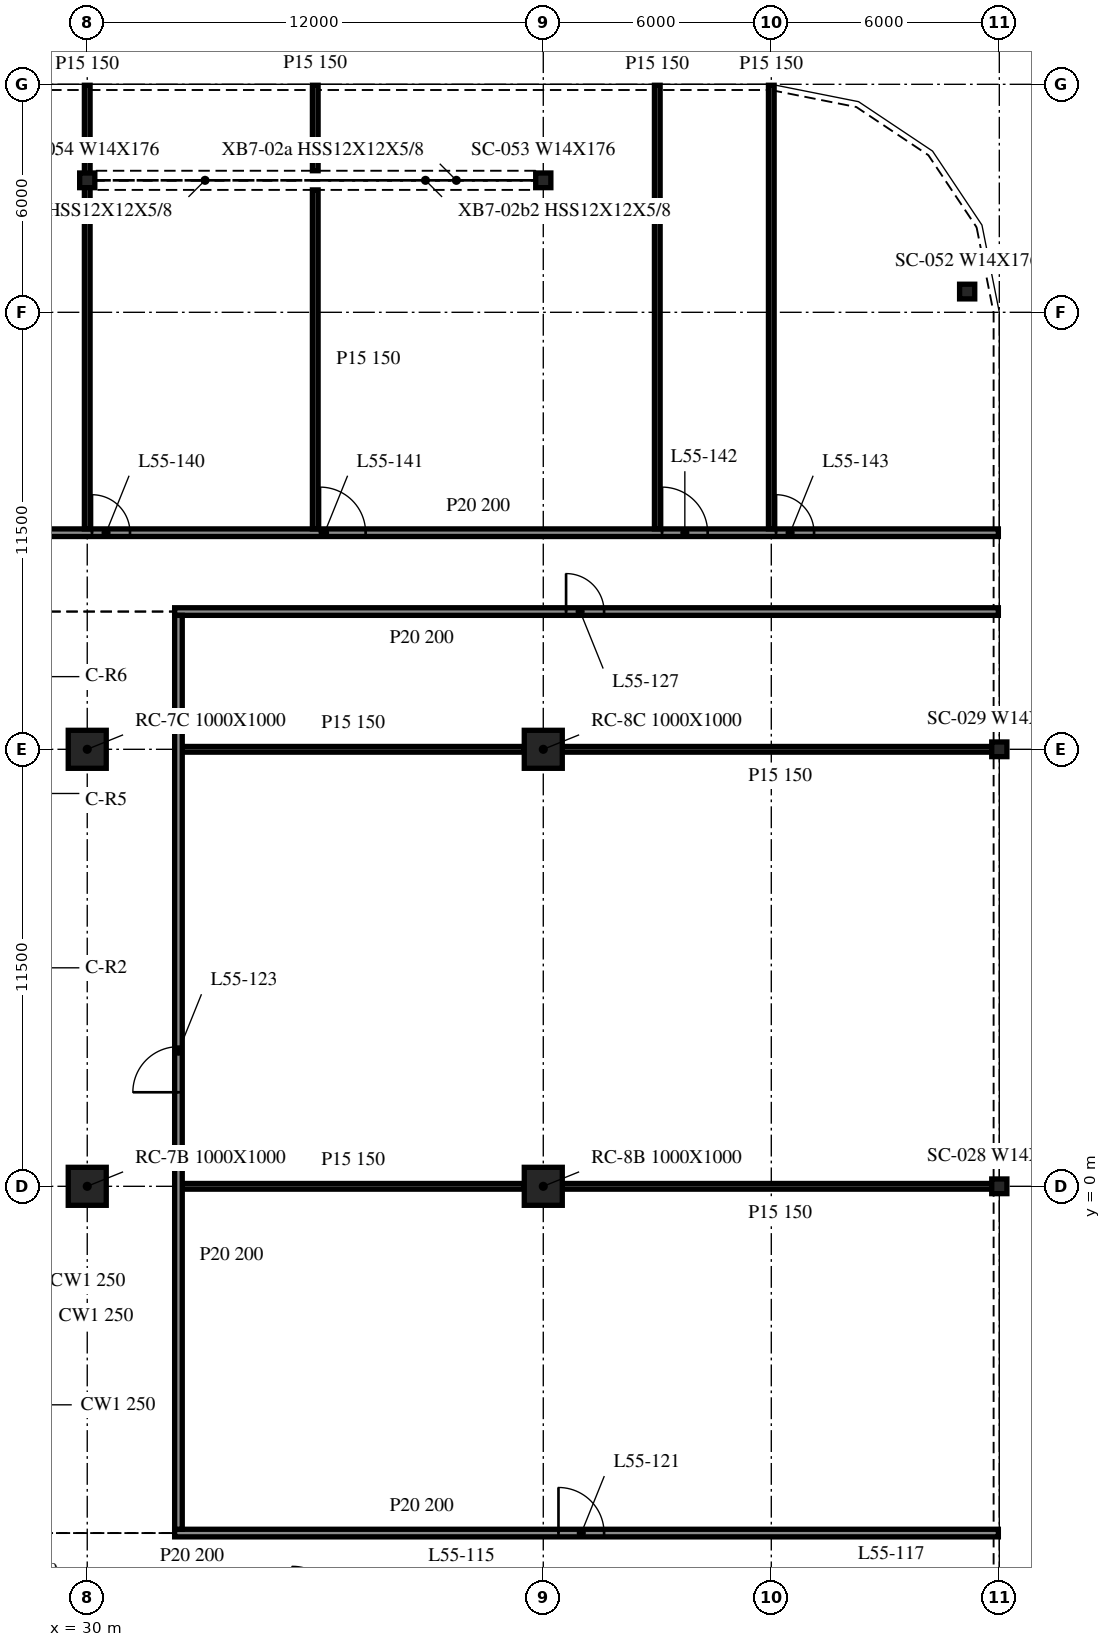
"""IFC4 building model, lengths in metres.
Left out: names, types, materials, properties, quantities, classifications, styles, units other than length and angle.
Written with IfcOpenShell. Run it as: python <this file> out.ifc"""

import sys

from ifc_helpers import new_model, si_unit, direction, frame, frame_2d, origin, origin_2d, place, context, subcontext, project, spatial, rectangle, i_section, extrude, element, fill, save


model = new_model("IFC4")
c1 = context("Model", 3, precision=1e-05, world=origin(), true_north=direction((0.0, 1.0)))
c2 = subcontext(c1, "Body", "Model", "MODEL_VIEW")
j1 = project(units=[si_unit("LENGTHUNIT", "METRE"), si_unit("PLANEANGLEUNIT", "RADIAN")], contexts=[c1])
p1 = place(None, origin())
s1 = spatial("IfcSite", under=j1, at=p1, CompositionType="ELEMENT")
p2 = place(p1, origin())
s2 = spatial("IfcBuilding", under=s1, at=p2, CompositionType="ELEMENT")
p3 = place(p2, frame((0.0, 0.0, 228.6)))
s3 = spatial("IfcBuildingStorey", under=s2, at=p3, CompositionType="ELEMENT", Elevation=228.6)
for number, where, z_axis, x_axis in (
    (1, (30.0, 0.0, -0.34), (0.0, 0.0, 1.0), (1.0, 0.0, 0.0)),
    (2, (30.0, 11.5, -0.34), (0.0, 0.0, 1.0), (1.0, 0.0, 0.0)),
    (3, (42.0, 0.0, -0.34), (0.0, 0.0, 1.0), (1.0, 0.0, 0.0)),
    (4, (42.0, 11.5, -0.34), (0.0, 0.0, 1.0), (1.0, 0.0, 0.0)),
):
    element("IfcColumn", number, at=place(p3, frame(where, z_axis=z_axis, x_axis=x_axis)), inside=s3, PredefinedType="COLUMN", context=c2, shape_type="SweptSolid", body=[
        extrude(rectangle(XDim=1.0, YDim=1.0, at=origin_2d()), origin(), (0.0, 0.0, 1.0), 3.8),
    ])
for number, where, z_axis, x_axis in (
    (5, (53.154, 23.546, -0.34), (0.0, 0.0, 1.0), (1.0, 0.0, 0.0)),
    (6, (42.0, 26.473, -0.34), (0.0, 0.0, 1.0), (1.0, 0.0, 0.0)),
    (7, (30.0, 26.473, -0.34), (0.0, 0.0, 1.0), (1.0, 0.0, 0.0)),
    (8, (54.0, 0.0, -0.34), (0.0, 0.0, 1.0), (1.0, 0.0, 0.0)),
    (9, (54.0, 11.5, -0.34), (0.0, 0.0, 1.0), (1.0, 0.0, 0.0)),
):
    element("IfcColumn", number, at=place(p3, frame(where, z_axis=z_axis, x_axis=x_axis)), inside=s3, PredefinedType="COLUMN", context=c2, shape_type="SweptSolid", body=[
        extrude(i_section(OverallWidth=0.399, OverallDepth=0.386, WebThickness=0.021, FlangeThickness=0.033, at=origin_2d()), origin(), (0.0, 0.0, 1.0), 3.8),
    ])
p4 = place(p3, frame((32.3, -9.125, 0.0), z_axis=(0.0, 0.0, 1.0), x_axis=(1.0, 0.0, 0.0)))
e10 = element("IfcWall", 10, at=p4, inside=s3, PredefinedType="PARTITIONING", context=c2, shape_type="SweptSolid", body=[
    extrude(rectangle(XDim=21.675, YDim=0.2, at=frame_2d((10.837, 0.0))), origin(), (0.0, 0.0, 1.0), 3.46),
])
p5 = place(p4, frame((10.1, 0.0, 0.0)))
e11 = element("IfcOpeningElement", 11, at=p5, cuts=e10, PredefinedType="OPENING", context=c2, shape_type="SweptSolid", body=[
    extrude(rectangle(XDim=1.2, YDim=2.1, at=frame_2d((0.6, 1.05))), frame((0.0, 0.11, 0.0), z_axis=(0.0, -1.0, 0.0), x_axis=(1.0, 0.0, 0.0)), (0.0, 0.0, 1.0), 0.22),
])
p6 = place(p3, frame((32.5, 0.0, 0.0), z_axis=(0.0, 0.0, 1.0), x_axis=(1.0, 0.0, 0.0)))
e12 = element("IfcWall", 12, at=p6, inside=s3, PredefinedType="PARTITIONING", context=c2, shape_type="SweptSolid", body=[
    extrude(rectangle(XDim=9.0, YDim=0.15, at=frame_2d((4.5, 0.0))), origin(), (0.0, 0.0, 1.0), 3.46),
])
p7 = place(p3, frame((42.5, 0.0, 0.0), z_axis=(0.0, 0.0, 1.0), x_axis=(1.0, 0.0, 0.0)))
e13 = element("IfcWall", 13, at=p7, inside=s3, PredefinedType="PARTITIONING", context=c2, shape_type="SweptSolid", body=[
    extrude(rectangle(XDim=11.475, YDim=0.15, at=frame_2d((5.738, 0.0))), origin(), (0.0, 0.0, 1.0), 3.46),
])
p8 = place(p3, frame((32.5, 11.5, 0.0), z_axis=(0.0, 0.0, 1.0), x_axis=(1.0, 0.0, 0.0)))
e14 = element("IfcWall", 14, at=p8, inside=s3, PredefinedType="PARTITIONING", context=c2, shape_type="SweptSolid", body=[
    extrude(rectangle(XDim=9.0, YDim=0.15, at=frame_2d((4.5, 0.0))), origin(), (0.0, 0.0, 1.0), 3.46),
])
p9 = place(p3, frame((42.5, 11.5, 0.0), z_axis=(0.0, 0.0, 1.0), x_axis=(1.0, 0.0, 0.0)))
e15 = element("IfcWall", 15, at=p9, inside=s3, PredefinedType="PARTITIONING", context=c2, shape_type="SweptSolid", body=[
    extrude(rectangle(XDim=11.475, YDim=0.15, at=frame_2d((5.738, 0.0))), origin(), (0.0, 0.0, 1.0), 3.46),
])
p10 = place(p3, frame((32.3, 15.125, 0.0), z_axis=(0.0, 0.0, 1.0), x_axis=(1.0, 0.0, 0.0)))
e16 = element("IfcWall", 16, at=p10, inside=s3, PredefinedType="PARTITIONING", context=c2, shape_type="SweptSolid", body=[
    extrude(rectangle(XDim=21.675, YDim=0.2, at=frame_2d((10.837, 0.0))), origin(), (0.0, 0.0, 1.0), 3.46),
])
p11 = place(p10, frame((10.3, 0.0, 0.0)))
e17 = element("IfcOpeningElement", 17, at=p11, cuts=e16, PredefinedType="OPENING", context=c2, shape_type="SweptSolid", body=[
    extrude(rectangle(XDim=1.0, YDim=2.1, at=frame_2d((0.5, 1.05))), frame((0.0, 0.11, 0.0), z_axis=(0.0, -1.0, 0.0), x_axis=(1.0, 0.0, 0.0)), (0.0, 0.0, 1.0), 0.22),
])
p12 = place(p3, frame((-41.975, 17.2, 0.0), z_axis=(0.0, 0.0, 1.0), x_axis=(1.0, 0.0, 0.0)))
e18 = element("IfcWall", 18, at=p12, inside=s3, PredefinedType="PARTITIONING", context=c2, shape_type="SweptSolid", body=[
    extrude(rectangle(XDim=95.95, YDim=0.2, at=frame_2d((47.975, 0.0))), origin(), (0.0, 0.0, 1.0), 3.46),
])
p13 = place(p12, frame((4.5, 0.0, 0.0)))
e19 = element("IfcOpeningElement", 19, at=p13, cuts=e18, PredefinedType="OPENING", context=c2, shape_type="SweptSolid", body=[
    extrude(rectangle(XDim=1.0, YDim=2.1, at=frame_2d((0.5, 1.05))), frame((0.0, 0.11, 0.0), z_axis=(0.0, -1.0, 0.0), x_axis=(1.0, 0.0, 0.0)), (0.0, 0.0, 1.0), 0.22),
])
p14 = place(p12, frame((13.3, 0.0, 0.0)))
e20 = element("IfcOpeningElement", 20, at=p14, cuts=e18, PredefinedType="OPENING", context=c2, shape_type="SweptSolid", body=[
    extrude(rectangle(XDim=1.2, YDim=2.1, at=frame_2d((0.6, 1.05))), frame((0.0, 0.11, 0.0), z_axis=(0.0, -1.0, 0.0), x_axis=(1.0, 0.0, 0.0)), (0.0, 0.0, 1.0), 0.22),
])
p15 = place(p12, frame((16.3, 0.0, 0.0)))
e21 = element("IfcOpeningElement", 21, at=p15, cuts=e18, PredefinedType="OPENING", context=c2, shape_type="SweptSolid", body=[
    extrude(rectangle(XDim=1.2, YDim=2.1, at=frame_2d((0.6, 1.05))), frame((0.0, 0.11, 0.0), z_axis=(0.0, -1.0, 0.0), x_axis=(1.0, 0.0, 0.0)), (0.0, 0.0, 1.0), 0.22),
])
p16 = place(p12, frame((22.5, 0.0, 0.0)))
e22 = element("IfcOpeningElement", 22, at=p16, cuts=e18, PredefinedType="OPENING", context=c2, shape_type="SweptSolid", body=[
    extrude(rectangle(XDim=1.0, YDim=2.1, at=frame_2d((0.5, 1.05))), frame((0.0, 0.11, 0.0), z_axis=(0.0, -1.0, 0.0), x_axis=(1.0, 0.0, 0.0)), (0.0, 0.0, 1.0), 0.22),
])
p17 = place(p12, frame((25.3, 0.0, 0.0)))
e23 = element("IfcOpeningElement", 23, at=p17, cuts=e18, PredefinedType="OPENING", context=c2, shape_type="SweptSolid", body=[
    extrude(rectangle(XDim=1.2, YDim=2.1, at=frame_2d((0.6, 1.05))), frame((0.0, 0.11, 0.0), z_axis=(0.0, -1.0, 0.0), x_axis=(1.0, 0.0, 0.0)), (0.0, 0.0, 1.0), 0.22),
])
p18 = place(p12, frame((34.3, 0.0, 0.0)))
e24 = element("IfcOpeningElement", 24, at=p18, cuts=e18, PredefinedType="OPENING", context=c2, shape_type="SweptSolid", body=[
    extrude(rectangle(XDim=1.2, YDim=2.1, at=frame_2d((0.6, 1.05))), frame((0.0, 0.11, 0.0), z_axis=(0.0, -1.0, 0.0), x_axis=(1.0, 0.0, 0.0)), (0.0, 0.0, 1.0), 0.22),
])
p19 = place(p12, frame((42.7, 0.0, 0.0)))
e25 = element("IfcOpeningElement", 25, at=p19, cuts=e18, PredefinedType="OPENING", context=c2, shape_type="SweptSolid", body=[
    extrude(rectangle(XDim=1.0, YDim=2.1, at=frame_2d((0.5, 1.05))), frame((0.0, 0.11, 0.0), z_axis=(0.0, -1.0, 0.0), x_axis=(1.0, 0.0, 0.0)), (0.0, 0.0, 1.0), 0.22),
])
p20 = place(p12, frame((47.3, 0.0, 0.0)))
e26 = element("IfcOpeningElement", 26, at=p20, cuts=e18, PredefinedType="OPENING", context=c2, shape_type="SweptSolid", body=[
    extrude(rectangle(XDim=1.2, YDim=2.1, at=frame_2d((0.6, 1.05))), frame((0.0, 0.11, 0.0), z_axis=(0.0, -1.0, 0.0), x_axis=(1.0, 0.0, 0.0)), (0.0, 0.0, 1.0), 0.22),
])
p21 = place(p12, frame((51.1, 0.0, 0.0)))
e27 = element("IfcOpeningElement", 27, at=p21, cuts=e18, PredefinedType="OPENING", context=c2, shape_type="SweptSolid", body=[
    extrude(rectangle(XDim=1.2, YDim=2.1, at=frame_2d((0.6, 1.05))), frame((0.0, 0.11, 0.0), z_axis=(0.0, -1.0, 0.0), x_axis=(1.0, 0.0, 0.0)), (0.0, 0.0, 1.0), 0.22),
])
p22 = place(p12, frame((54.1, 0.0, 0.0)))
e28 = element("IfcOpeningElement", 28, at=p22, cuts=e18, PredefinedType="OPENING", context=c2, shape_type="SweptSolid", body=[
    extrude(rectangle(XDim=1.0, YDim=2.1, at=frame_2d((0.5, 1.05))), frame((0.0, 0.11, 0.0), z_axis=(0.0, -1.0, 0.0), x_axis=(1.0, 0.0, 0.0)), (0.0, 0.0, 1.0), 0.22),
])
p23 = place(p12, frame((60.1, 0.0, 0.0)))
e29 = element("IfcOpeningElement", 29, at=p23, cuts=e18, PredefinedType="OPENING", context=c2, shape_type="SweptSolid", body=[
    extrude(rectangle(XDim=1.2, YDim=2.1, at=frame_2d((0.6, 1.05))), frame((0.0, 0.11, 0.0), z_axis=(0.0, -1.0, 0.0), x_axis=(1.0, 0.0, 0.0)), (0.0, 0.0, 1.0), 0.22),
])
p24 = place(p12, frame((63.1, 0.0, 0.0)))
e30 = element("IfcOpeningElement", 30, at=p24, cuts=e18, PredefinedType="OPENING", context=c2, shape_type="SweptSolid", body=[
    extrude(rectangle(XDim=1.2, YDim=2.1, at=frame_2d((0.6, 1.05))), frame((0.0, 0.11, 0.0), z_axis=(0.0, -1.0, 0.0), x_axis=(1.0, 0.0, 0.0)), (0.0, 0.0, 1.0), 0.22),
])
p25 = place(p12, frame((72.1, 0.0, 0.0)))
e31 = element("IfcOpeningElement", 31, at=p25, cuts=e18, PredefinedType="OPENING", context=c2, shape_type="SweptSolid", body=[
    extrude(rectangle(XDim=1.0, YDim=2.1, at=frame_2d((0.5, 1.05))), frame((0.0, 0.11, 0.0), z_axis=(0.0, -1.0, 0.0), x_axis=(1.0, 0.0, 0.0)), (0.0, 0.0, 1.0), 0.22),
])
p26 = place(p12, frame((78.1, 0.0, 0.0)))
e32 = element("IfcOpeningElement", 32, at=p26, cuts=e18, PredefinedType="OPENING", context=c2, shape_type="SweptSolid", body=[
    extrude(rectangle(XDim=1.2, YDim=2.1, at=frame_2d((0.6, 1.05))), frame((0.0, 0.11, 0.0), z_axis=(0.0, -1.0, 0.0), x_axis=(1.0, 0.0, 0.0)), (0.0, 0.0, 1.0), 0.22),
])
p27 = place(p12, frame((87.1, 0.0, 0.0)))
e33 = element("IfcOpeningElement", 33, at=p27, cuts=e18, PredefinedType="OPENING", context=c2, shape_type="SweptSolid", body=[
    extrude(rectangle(XDim=1.2, YDim=2.1, at=frame_2d((0.6, 1.05))), frame((0.0, 0.11, 0.0), z_axis=(0.0, -1.0, 0.0), x_axis=(1.0, 0.0, 0.0)), (0.0, 0.0, 1.0), 0.22),
])
p28 = place(p12, frame((90.1, 0.0, 0.0)))
e34 = element("IfcOpeningElement", 34, at=p28, cuts=e18, PredefinedType="OPENING", context=c2, shape_type="SweptSolid", body=[
    extrude(rectangle(XDim=1.0, YDim=2.1, at=frame_2d((0.5, 1.05))), frame((0.0, 0.11, 0.0), z_axis=(0.0, -1.0, 0.0), x_axis=(1.0, 0.0, 0.0)), (0.0, 0.0, 1.0), 0.22),
])
p29 = place(p3, frame((30.0, 17.3, 0.0), z_axis=(0.0, 0.0, 1.0), x_axis=(0.0, 1.0, 0.0)))
e35 = element("IfcWall", 35, at=p29, inside=s3, PredefinedType="PARTITIONING", context=c2, shape_type="SweptSolid", body=[
    extrude(rectangle(XDim=11.675, YDim=0.15, at=frame_2d((5.837, 0.0))), origin(), (0.0, 0.0, 1.0), 3.46),
])
p30 = place(p3, frame((32.4, -9.025, 0.0), z_axis=(0.0, 0.0, 1.0), x_axis=(0.0, 1.0, 0.0)))
e36 = element("IfcWall", 36, at=p30, inside=s3, PredefinedType="PARTITIONING", context=c2, shape_type="SweptSolid", body=[
    extrude(rectangle(XDim=24.05, YDim=0.2, at=frame_2d((12.025, 0.0))), origin(), (0.0, 0.0, 1.0), 3.46),
])
p31 = place(p30, frame((11.5, 0.0, 0.0)))
e37 = element("IfcOpeningElement", 37, at=p31, cuts=e36, PredefinedType="OPENING", context=c2, shape_type="SweptSolid", body=[
    extrude(rectangle(XDim=1.2, YDim=2.1, at=frame_2d((0.6, 1.05))), frame((0.0, 0.11, 0.0), z_axis=(0.0, -1.0, 0.0), x_axis=(1.0, 0.0, 0.0)), (0.0, 0.0, 1.0), 0.22),
])
p32 = place(p3, frame((36.0, 17.3, 0.0), z_axis=(0.0, 0.0, 1.0), x_axis=(0.0, 1.0, 0.0)))
e38 = element("IfcWall", 38, at=p32, inside=s3, PredefinedType="PARTITIONING", context=c2, shape_type="SweptSolid", body=[
    extrude(rectangle(XDim=8.921, YDim=0.15, at=frame_2d((4.46, 0.0))), origin(), (0.0, 0.0, 1.0), 3.46),
])
p33 = place(p3, frame((36.0, 26.725, 0.0), z_axis=(0.0, 0.0, 1.0), x_axis=(0.0, 1.0, 0.0)))
e39 = element("IfcWall", 39, at=p33, inside=s3, PredefinedType="PARTITIONING", context=c2, shape_type="SweptSolid", body=[
    extrude(rectangle(XDim=2.25, YDim=0.15, at=frame_2d((1.125, 0.0))), origin(), (0.0, 0.0, 1.0), 3.46),
])
for number, where, z_axis, x_axis in (
    (40, (45.0, 17.3, 0.0), (0.0, 0.0, 1.0), (0.0, 1.0, 0.0)),
    (41, (48.0, 17.3, 0.0), (0.0, 0.0, 1.0), (0.0, 1.0, 0.0)),
):
    element("IfcWall", number, at=place(p3, frame(where, z_axis=z_axis, x_axis=x_axis)), inside=s3, PredefinedType="PARTITIONING", context=c2, shape_type="SweptSolid", body=[
        extrude(rectangle(XDim=11.675, YDim=0.15, at=frame_2d((5.837, 0.0))), origin(), (0.0, 0.0, 1.0), 3.46),
    ])
p34 = place(p5, origin())
e42 = element("IfcDoor", 42, at=p34, inside=s3, OperationType="SINGLE_SWING_LEFT", PredefinedType="DOOR", context=c2, shape_type="SweptSolid", body=[
    extrude(rectangle(XDim=1.2, YDim=2.1, at=frame_2d((0.6, 1.05))), frame((0.0, 0.025, 0.0), z_axis=(0.0, -1.0, 0.0), x_axis=(1.0, 0.0, 0.0)), (0.0, 0.0, 1.0), 0.05),
])
fill(e11, e42)
p35 = place(p31, origin())
e43 = element("IfcDoor", 43, at=p35, inside=s3, OperationType="SINGLE_SWING_LEFT", PredefinedType="DOOR", context=c2, shape_type="SweptSolid", body=[
    extrude(rectangle(XDim=1.2, YDim=2.1, at=frame_2d((0.6, 1.05))), frame((0.0, 0.025, 0.0), z_axis=(0.0, -1.0, 0.0), x_axis=(1.0, 0.0, 0.0)), (0.0, 0.0, 1.0), 0.05),
])
fill(e37, e43)
p36 = place(p11, origin())
e44 = element("IfcDoor", 44, at=p36, inside=s3, OperationType="SINGLE_SWING_LEFT", PredefinedType="DOOR", context=c2, shape_type="SweptSolid", body=[
    extrude(rectangle(XDim=1.0, YDim=2.1, at=frame_2d((0.5, 1.05))), frame((0.0, 0.025, 0.0), z_axis=(0.0, -1.0, 0.0), x_axis=(1.0, 0.0, 0.0)), (0.0, 0.0, 1.0), 0.05),
])
fill(e17, e44)
p37 = place(p25, origin())
e45 = element("IfcDoor", 45, at=p37, inside=s3, OperationType="SINGLE_SWING_RIGHT", PredefinedType="DOOR", context=c2, shape_type="SweptSolid", body=[
    extrude(rectangle(XDim=1.0, YDim=2.1, at=frame_2d((0.5, 1.05))), frame((0.0, 0.025, 0.0), z_axis=(0.0, -1.0, 0.0), x_axis=(1.0, 0.0, 0.0)), (0.0, 0.0, 1.0), 0.05),
])
fill(e31, e45)
p38 = place(p26, origin())
e46 = element("IfcDoor", 46, at=p38, inside=s3, OperationType="SINGLE_SWING_RIGHT", PredefinedType="DOOR", context=c2, shape_type="SweptSolid", body=[
    extrude(rectangle(XDim=1.2, YDim=2.1, at=frame_2d((0.6, 1.05))), frame((0.0, 0.025, 0.0), z_axis=(0.0, -1.0, 0.0), x_axis=(1.0, 0.0, 0.0)), (0.0, 0.0, 1.0), 0.05),
])
fill(e32, e46)
p39 = place(p27, origin())
e47 = element("IfcDoor", 47, at=p39, inside=s3, OperationType="SINGLE_SWING_RIGHT", PredefinedType="DOOR", context=c2, shape_type="SweptSolid", body=[
    extrude(rectangle(XDim=1.2, YDim=2.1, at=frame_2d((0.6, 1.05))), frame((0.0, 0.025, 0.0), z_axis=(0.0, -1.0, 0.0), x_axis=(1.0, 0.0, 0.0)), (0.0, 0.0, 1.0), 0.05),
])
fill(e33, e47)
p40 = place(p28, origin())
e48 = element("IfcDoor", 48, at=p40, inside=s3, OperationType="SINGLE_SWING_RIGHT", PredefinedType="DOOR", context=c2, shape_type="SweptSolid", body=[
    extrude(rectangle(XDim=1.0, YDim=2.1, at=frame_2d((0.5, 1.05))), frame((0.0, 0.025, 0.0), z_axis=(0.0, -1.0, 0.0), x_axis=(1.0, 0.0, 0.0)), (0.0, 0.0, 1.0), 0.05),
])
fill(e34, e48)
save(model, sys.argv[1])
